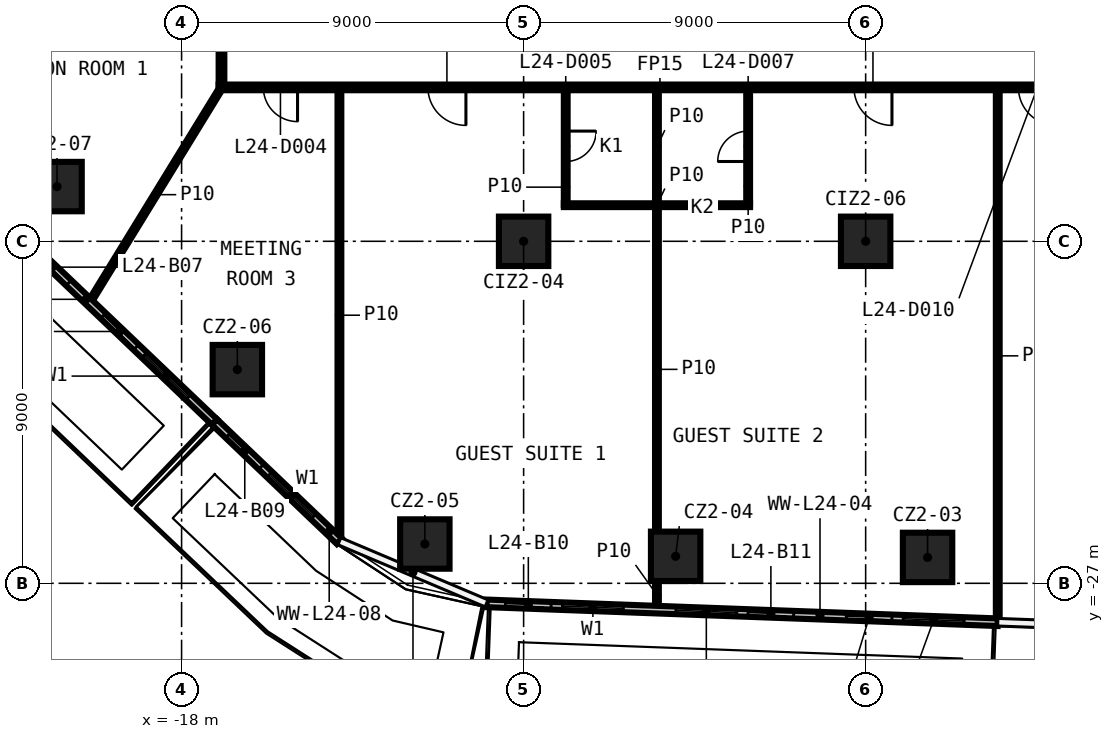
"""IFC4 building model, lengths in metres.
Left out: names, types, materials, properties, quantities, classifications, styles, units other than length and angle.
Written with IfcOpenShell. Run it as: python <this file> out.ifc"""

import sys

from ifc_helpers import new_model, si_unit, direction, frame, frame_2d, origin, origin_2d, place, context, subcontext, project, spatial, rectangle, extrude, element, fill, save


model = new_model("IFC4")
c1 = context("Model", 3, precision=1e-05, world=origin(), true_north=direction((0.0, 1.0)))
c2 = subcontext(c1, "Body", "Model", "MODEL_VIEW")
j1 = project(units=[si_unit("LENGTHUNIT", "METRE"), si_unit("PLANEANGLEUNIT", "RADIAN")], contexts=[c1])
p1 = place(None, origin())
s1 = spatial("IfcSite", under=j1, at=p1, CompositionType="ELEMENT")
p2 = place(p1, origin())
s2 = spatial("IfcBuilding", under=s1, at=p2, CompositionType="ELEMENT")
p3 = place(p2, frame((0.0, 0.0, 113.7)))
s3 = spatial("IfcBuildingStorey", under=s2, at=p3, CompositionType="ELEMENT", Elevation=113.7)
for number, where, z_axis, x_axis in (
    (1, (1.629, -26.319, 0.0), (0.0, 0.0, 1.0), (1.0, 0.0, 0.0)),
    (2, (-5.0, -26.29, 0.0), (0.0, 0.0, 1.0), (1.0, 0.0, 0.0)),
    (3, (-11.599, -25.966, 0.0), (0.0, 0.0, 1.0), (1.0, 0.0, 0.0)),
    (4, (-16.533, -21.377, 0.0), (0.0, 0.0, 1.0), (1.0, 0.0, 0.0)),
    (5, (-21.277, -16.56, 0.0), (0.0, 0.0, 1.0), (1.0, 0.0, 0.0)),
    (6, (-9.0, -18.0, 0.0), (0.0, 0.0, 1.0), (1.0, 0.0, 0.0)),
    (7, (0.0, -18.0, 0.0), (0.0, 0.0, 1.0), (1.0, 0.0, 0.0)),
):
    element("IfcColumn", number, at=place(p3, frame(where, z_axis=z_axis, x_axis=x_axis)), inside=s3, PredefinedType="COLUMN", context=c2, shape_type="SweptSolid", body=[
        extrude(rectangle(XDim=1.3, YDim=1.3, at=origin_2d()), origin(), (0.0, 0.0, 1.0), 3.3),
    ])
p4 = place(p3, frame((-7.942, -17.05, 0.0), z_axis=(0.0, 0.0, 1.0), x_axis=(1.0, 0.0, 0.0)))
e8 = element("IfcWall", 8, at=p4, inside=s3, PredefinedType="PARTITIONING", context=c2, shape_type="SweptSolid", body=[
    extrude(rectangle(XDim=4.9, YDim=0.1, at=frame_2d((2.45, 0.0))), origin(), (0.0, 0.0, 1.0), 3.3),
])
p5 = place(p3, frame((17.025, -13.95, 0.0), z_axis=(0.0, 0.0, 1.0), x_axis=(-1.0, 0.0, 0.0)))
e9 = element("IfcWall", 9, at=p5, inside=s3, PredefinedType="PARTITIONING", context=c2, shape_type="SweptSolid", body=[
    extrude(rectangle(XDim=34.05, YDim=0.15, at=frame_2d((17.025, 0.0))), origin(), (0.0, 0.0, 1.0), 3.3),
])
p6 = place(p5, frame((31.974, 0.0, 0.0)))
e10 = element("IfcOpeningElement", 10, at=p6, cuts=e9, PredefinedType="OPENING", context=c2, shape_type="SweptSolid", body=[
    extrude(rectangle(XDim=0.9, YDim=2.1, at=frame_2d((0.45, 1.05))), frame((0.0, 0.085, 0.0), z_axis=(0.0, -1.0, 0.0), x_axis=(1.0, 0.0, 0.0)), (0.0, 0.0, 1.0), 0.17),
])
p7 = place(p5, frame((27.543, 0.0, 0.0)))
e11 = element("IfcOpeningElement", 11, at=p7, cuts=e9, PredefinedType="OPENING", context=c2, shape_type="SweptSolid", body=[
    extrude(rectangle(XDim=1.0, YDim=2.1, at=frame_2d((0.5, 1.05))), frame((0.0, 0.085, 0.0), z_axis=(0.0, -1.0, 0.0), x_axis=(1.0, 0.0, 0.0)), (0.0, 0.0, 1.0), 0.17),
])
p8 = place(p5, frame((16.333, 0.0, 0.0)))
e12 = element("IfcOpeningElement", 12, at=p8, cuts=e9, PredefinedType="OPENING", context=c2, shape_type="SweptSolid", body=[
    extrude(rectangle(XDim=1.0, YDim=2.1, at=frame_2d((0.5, 1.05))), frame((0.0, 0.085, 0.0), z_axis=(0.0, -1.0, 0.0), x_axis=(1.0, 0.0, 0.0)), (0.0, 0.0, 1.0), 0.17),
])
p9 = place(p5, frame((12.006, 0.0, 0.0)))
e13 = element("IfcOpeningElement", 13, at=p9, cuts=e9, PredefinedType="OPENING", context=c2, shape_type="SweptSolid", body=[
    extrude(rectangle(XDim=1.0, YDim=2.1, at=frame_2d((0.5, 1.05))), frame((0.0, 0.085, 0.0), z_axis=(0.0, -1.0, 0.0), x_axis=(1.0, 0.0, 0.0)), (0.0, 0.0, 1.0), 0.17),
])
p10 = place(p5, frame((5.124, 0.0, 0.0)))
e14 = element("IfcOpeningElement", 14, at=p10, cuts=e9, PredefinedType="OPENING", context=c2, shape_type="SweptSolid", body=[
    extrude(rectangle(XDim=1.0, YDim=2.1, at=frame_2d((0.5, 1.05))), frame((0.0, 0.085, 0.0), z_axis=(0.0, -1.0, 0.0), x_axis=(1.0, 0.0, 0.0)), (0.0, 0.0, 1.0), 0.17),
])
p11 = place(p5, frame((3.144, 0.0, 0.0)))
e15 = element("IfcOpeningElement", 15, at=p11, cuts=e9, PredefinedType="OPENING", context=c2, shape_type="SweptSolid", body=[
    extrude(rectangle(XDim=1.0, YDim=2.1, at=frame_2d((0.5, 1.05))), frame((0.0, 0.085, 0.0), z_axis=(0.0, -1.0, 0.0), x_axis=(1.0, 0.0, 0.0)), (0.0, 0.0, 1.0), 0.17),
])
p12 = place(p3, frame((-20.415, -19.596, 0.0), z_axis=(0.0, 0.0, 1.0), x_axis=(0.5230874117, 0.85227903865, 0.0)))
e16 = element("IfcWall", 16, at=p12, inside=s3, PredefinedType="PARTITIONING", context=c2, shape_type="SweptSolid", body=[
    extrude(rectangle(XDim=6.624, YDim=0.1, at=frame_2d((3.312, 0.0))), origin(), (0.0, 0.0, 1.0), 3.3),
])
p13 = place(p3, frame((3.476, -28.004, 0.0), z_axis=(0.0, 0.0, 1.0), x_axis=(0.0, 1.0, 0.0)))
e17 = element("IfcWall", 17, at=p13, inside=s3, PredefinedType="PARTITIONING", context=c2, shape_type="SweptSolid", body=[
    extrude(rectangle(XDim=13.979, YDim=0.1, at=frame_2d((6.99, 0.0))), origin(), (0.0, 0.0, 1.0), 3.3),
])
p14 = place(p3, frame((-3.092, -17.0, 0.0), z_axis=(0.0, 0.0, 1.0), x_axis=(0.0, 1.0, 0.0)))
e18 = element("IfcWall", 18, at=p14, inside=s3, PredefinedType="PARTITIONING", context=c2, shape_type="SweptSolid", body=[
    extrude(rectangle(XDim=2.975, YDim=0.1, at=frame_2d((1.488, 0.0))), origin(), (0.0, 0.0, 1.0), 3.3),
])
p15 = place(p14, frame((1.1, 0.0, 0.0)))
e19 = element("IfcOpeningElement", 19, at=p15, cuts=e18, PredefinedType="OPENING", context=c2, shape_type="SweptSolid", body=[
    extrude(rectangle(XDim=0.8, YDim=2.1, at=frame_2d((0.4, 1.05))), frame((0.0, 0.06, 0.0), z_axis=(0.0, -1.0, 0.0), x_axis=(1.0, 0.0, 0.0)), (0.0, 0.0, 1.0), 0.12),
])
p16 = place(p3, frame((-5.492, -27.673, 0.0), z_axis=(0.0, 0.0, 1.0), x_axis=(0.0, 1.0, 0.0)))
e20 = element("IfcWall", 20, at=p16, inside=s3, PredefinedType="PARTITIONING", context=c2, shape_type="SweptSolid", body=[
    extrude(rectangle(XDim=0.733, YDim=0.1, at=frame_2d((0.367, 0.0))), origin(), (0.0, 0.0, 1.0), 3.3),
])
p17 = place(p3, frame((-5.492, -25.64, 0.0), z_axis=(0.0, 0.0, 1.0), x_axis=(0.0, 1.0, 0.0)))
e21 = element("IfcWall", 21, at=p17, inside=s3, PredefinedType="PARTITIONING", context=c2, shape_type="SweptSolid", body=[
    extrude(rectangle(XDim=8.54, YDim=0.1, at=frame_2d((4.27, 0.0))), origin(), (0.0, 0.0, 1.0), 3.3),
])
p18 = place(p3, frame((-5.492, -17.0, 0.0), z_axis=(0.0, 0.0, 1.0), x_axis=(0.0, 1.0, 0.0)))
e22 = element("IfcWall", 22, at=p18, inside=s3, PredefinedType="PARTITIONING", context=c2, shape_type="SweptSolid", body=[
    extrude(rectangle(XDim=2.975, YDim=0.1, at=frame_2d((1.488, 0.0))), origin(), (0.0, 0.0, 1.0), 3.3),
])
p19 = place(p3, frame((-7.892, -14.025, 0.0), z_axis=(0.0, 0.0, 1.0), x_axis=(0.0, -1.0, 0.0)))
e23 = element("IfcWall", 23, at=p19, inside=s3, PredefinedType="PARTITIONING", context=c2, shape_type="SweptSolid", body=[
    extrude(rectangle(XDim=3.025, YDim=0.1, at=frame_2d((1.513, 0.0))), origin(), (0.0, 0.0, 1.0), 3.3),
])
p20 = place(p19, frame((1.075, 0.0, 0.0)))
e24 = element("IfcOpeningElement", 24, at=p20, cuts=e23, PredefinedType="OPENING", context=c2, shape_type="SweptSolid", body=[
    extrude(rectangle(XDim=0.8, YDim=2.1, at=frame_2d((0.4, 1.05))), frame((0.0, 0.06, 0.0), z_axis=(0.0, -1.0, 0.0), x_axis=(1.0, 0.0, 0.0)), (0.0, 0.0, 1.0), 0.12),
])
p21 = place(p3, frame((-13.847, -25.865, 0.0), z_axis=(0.0, 0.0, 1.0), x_axis=(0.0, 1.0, 0.0)))
e25 = element("IfcWall", 25, at=p21, inside=s3, PredefinedType="PARTITIONING", context=c2, shape_type="SweptSolid", body=[
    extrude(rectangle(XDim=11.84, YDim=0.1, at=frame_2d((5.92, 0.0))), origin(), (0.0, 0.0, 1.0), 3.3),
])
p22 = place(p3, frame((-16.95, -13.875, 0.0), z_axis=(0.0, 0.0, 1.0), x_axis=(0.0, 1.0, 0.0)))
e26 = element("IfcWall", 26, at=p22, inside=s3, PredefinedType="PARTITIONING", context=c2, shape_type="SweptSolid", body=[
    extrude(rectangle(XDim=27.75, YDim=0.15, at=frame_2d((13.875, 0.0))), origin(), (0.0, 0.0, 1.0), 3.3),
])
p23 = place(p22, frame((11.06, 0.0, 0.0)))
e27 = element("IfcOpeningElement", 27, at=p23, cuts=e26, PredefinedType="OPENING", context=c2, shape_type="SweptSolid", body=[
    extrude(rectangle(XDim=0.9, YDim=2.1, at=frame_2d((0.45, 1.05))), frame((0.0, 0.085, 0.0), z_axis=(0.0, -1.0, 0.0), x_axis=(1.0, 0.0, 0.0)), (0.0, 0.0, 1.0), 0.17),
])
p24 = place(p22, frame((8.387, 0.0, 0.0)))
e28 = element("IfcOpeningElement", 28, at=p24, cuts=e26, PredefinedType="OPENING", context=c2, shape_type="SweptSolid", body=[
    extrude(rectangle(XDim=0.9, YDim=2.1, at=frame_2d((0.45, 1.05))), frame((0.0, 0.085, 0.0), z_axis=(0.0, -1.0, 0.0), x_axis=(1.0, 0.0, 0.0)), (0.0, 0.0, 1.0), 0.17),
])
p25 = place(p22, frame((1.666, 0.0, 0.0)))
e29 = element("IfcOpeningElement", 29, at=p25, cuts=e26, PredefinedType="OPENING", context=c2, shape_type="SweptSolid", body=[
    extrude(rectangle(XDim=0.9, YDim=2.1, at=frame_2d((0.45, 1.05))), frame((0.0, 0.085, 0.0), z_axis=(0.0, -1.0, 0.0), x_axis=(1.0, 0.0, 0.0)), (0.0, 0.0, 1.0), 0.17),
])
p26 = place(p22, frame((25.152, 0.0, 0.0)))
e30 = element("IfcOpeningElement", 30, at=p26, cuts=e26, PredefinedType="OPENING", context=c2, shape_type="SweptSolid", body=[
    extrude(rectangle(XDim=0.9, YDim=2.1, at=frame_2d((0.45, 1.05))), frame((0.0, 0.085, 0.0), z_axis=(0.0, -1.0, 0.0), x_axis=(1.0, 0.0, 0.0)), (0.0, 0.0, 1.0), 0.17),
])
p27 = place(p22, frame((18.782, 0.0, 0.0)))
e31 = element("IfcOpeningElement", 31, at=p27, cuts=e26, PredefinedType="OPENING", context=c2, shape_type="SweptSolid", body=[
    extrude(rectangle(XDim=1.0, YDim=2.1, at=frame_2d((0.5, 1.05))), frame((0.0, 0.085, 0.0), z_axis=(0.0, -1.0, 0.0), x_axis=(1.0, 0.0, 0.0)), (0.0, 0.0, 1.0), 0.17),
])
p28 = place(p22, frame((17.26, 0.0, 0.0)))
e32 = element("IfcOpeningElement", 32, at=p28, cuts=e26, PredefinedType="OPENING", context=c2, shape_type="SweptSolid", body=[
    extrude(rectangle(XDim=1.0, YDim=2.1, at=frame_2d((0.5, 1.05))), frame((0.0, 0.085, 0.0), z_axis=(0.0, -1.0, 0.0), x_axis=(1.0, 0.0, 0.0)), (0.0, 0.0, 1.0), 0.17),
])
p29 = place(p3, frame((-23.718, -16.471, 0.0), z_axis=(0.0, 0.0, 1.0), x_axis=(0.723342757747, -0.690489141706, 0.0)))
e33 = element("IfcWall", 33, at=p29, inside=s3, PredefinedType="SOLIDWALL", context=c2, shape_type="SweptSolid", body=[
    extrude(rectangle(XDim=9.103, YDim=0.2, at=frame_2d((4.552, 0.0))), origin(), (0.0, 0.0, 1.0), 3.3),
])
p30 = place(p29, frame((0.5, 0.0, 0.6)))
e34 = element("IfcOpeningElement", 34, at=p30, cuts=e33, PredefinedType="OPENING", context=c2, shape_type="SweptSolid", body=[
    extrude(rectangle(XDim=1.6, YDim=2.4, at=frame_2d((0.8, 1.2))), frame((0.0, 0.11, 0.0), z_axis=(0.0, -1.0, 0.0), x_axis=(1.0, 0.0, 0.0)), (0.0, 0.0, 1.0), 0.22),
])
p31 = place(p29, frame((2.6, 0.0, 0.0)))
e35 = element("IfcOpeningElement", 35, at=p31, cuts=e33, PredefinedType="OPENING", context=c2, shape_type="SweptSolid", body=[
    extrude(rectangle(XDim=1.2, YDim=2.4, at=frame_2d((0.6, 1.2))), frame((0.0, 0.11, 0.0), z_axis=(0.0, -1.0, 0.0), x_axis=(1.0, 0.0, 0.0)), (0.0, 0.0, 1.0), 0.22),
])
p32 = place(p29, frame((6.552, 0.0, 0.6)))
e36 = element("IfcOpeningElement", 36, at=p32, cuts=e33, PredefinedType="OPENING", context=c2, shape_type="SweptSolid", body=[
    extrude(rectangle(XDim=1.6, YDim=2.4, at=frame_2d((0.8, 1.2))), frame((0.0, 0.11, 0.0), z_axis=(0.0, -1.0, 0.0), x_axis=(1.0, 0.0, 0.0)), (0.0, 0.0, 1.0), 0.22),
])
p33 = place(p29, frame((5.052, 0.0, 0.0)))
e37 = element("IfcOpeningElement", 37, at=p33, cuts=e33, PredefinedType="OPENING", context=c2, shape_type="SweptSolid", body=[
    extrude(rectangle(XDim=1.2, YDim=2.4, at=frame_2d((0.6, 1.2))), frame((0.0, 0.11, 0.0), z_axis=(0.0, -1.0, 0.0), x_axis=(1.0, 0.0, 0.0)), (0.0, 0.0, 1.0), 0.22),
])
p34 = place(p3, frame((-17.133, -22.756, 0.0), z_axis=(0.0, 0.0, 1.0), x_axis=(0.723361644964, -0.69046935529, 0.0)))
e38 = element("IfcWall", 38, at=p34, inside=s3, PredefinedType="SOLIDWALL", context=c2, shape_type="SweptSolid", body=[
    extrude(rectangle(XDim=4.542, YDim=0.2, at=frame_2d((2.271, 0.0))), origin(), (0.0, 0.0, 1.0), 3.3),
])
p35 = place(p34, frame((2.0, 0.0, 0.6)))
e39 = element("IfcOpeningElement", 39, at=p35, cuts=e38, PredefinedType="OPENING", context=c2, shape_type="SweptSolid", body=[
    extrude(rectangle(XDim=1.6, YDim=2.4, at=frame_2d((0.8, 1.2))), frame((0.0, 0.11, 0.0), z_axis=(0.0, -1.0, 0.0), x_axis=(1.0, 0.0, 0.0)), (0.0, 0.0, 1.0), 0.22),
])
p36 = place(p34, frame((0.5, 0.0, 0.0)))
e40 = element("IfcOpeningElement", 40, at=p36, cuts=e38, PredefinedType="OPENING", context=c2, shape_type="SweptSolid", body=[
    extrude(rectangle(XDim=1.2, YDim=2.4, at=frame_2d((0.6, 1.2))), frame((0.0, 0.11, 0.0), z_axis=(0.0, -1.0, 0.0), x_axis=(1.0, 0.0, 0.0)), (0.0, 0.0, 1.0), 0.22),
])
p37 = place(p3, frame((-9.975, -27.528, 0.0), z_axis=(0.0, 0.0, 1.0), x_axis=(0.999319917794, -0.036874135924, 0.0)))
e41 = element("IfcWall", 41, at=p37, inside=s3, PredefinedType="SOLIDWALL", context=c2, shape_type="SweptSolid", body=[
    extrude(rectangle(XDim=13.46, YDim=0.2, at=frame_2d((6.73, 0.0))), origin(), (0.0, 0.0, 1.0), 3.3),
])
p38 = place(p37, frame((2.0, 0.0, 0.6)))
e42 = element("IfcOpeningElement", 42, at=p38, cuts=e41, PredefinedType="OPENING", context=c2, shape_type="SweptSolid", body=[
    extrude(rectangle(XDim=1.6, YDim=2.4, at=frame_2d((0.8, 1.2))), frame((0.0, 0.11, 0.0), z_axis=(0.0, -1.0, 0.0), x_axis=(1.0, 0.0, 0.0)), (0.0, 0.0, 1.0), 0.22),
])
p39 = place(p37, frame((0.5, 0.0, 0.0)))
e43 = element("IfcOpeningElement", 43, at=p39, cuts=e41, PredefinedType="OPENING", context=c2, shape_type="SweptSolid", body=[
    extrude(rectangle(XDim=1.2, YDim=2.4, at=frame_2d((0.6, 1.2))), frame((0.0, 0.11, 0.0), z_axis=(0.0, -1.0, 0.0), x_axis=(1.0, 0.0, 0.0)), (0.0, 0.0, 1.0), 0.22),
])
p40 = place(p37, frame((4.987, 0.0, 0.6)))
e44 = element("IfcOpeningElement", 44, at=p40, cuts=e41, PredefinedType="OPENING", context=c2, shape_type="SweptSolid", body=[
    extrude(rectangle(XDim=1.6, YDim=2.4, at=frame_2d((0.8, 1.2))), frame((0.0, 0.11, 0.0), z_axis=(0.0, -1.0, 0.0), x_axis=(1.0, 0.0, 0.0)), (0.0, 0.0, 1.0), 0.22),
])
p41 = place(p37, frame((6.887, 0.0, 0.0)))
e45 = element("IfcOpeningElement", 45, at=p41, cuts=e41, PredefinedType="OPENING", context=c2, shape_type="SweptSolid", body=[
    extrude(rectangle(XDim=1.2, YDim=2.4, at=frame_2d((0.6, 1.2))), frame((0.0, 0.11, 0.0), z_axis=(0.0, -1.0, 0.0), x_axis=(1.0, 0.0, 0.0)), (0.0, 0.0, 1.0), 0.22),
])
p42 = place(p37, frame((10.974, 0.0, 0.6)))
e46 = element("IfcOpeningElement", 46, at=p42, cuts=e41, PredefinedType="OPENING", context=c2, shape_type="SweptSolid", body=[
    extrude(rectangle(XDim=1.6, YDim=2.4, at=frame_2d((0.8, 1.2))), frame((0.0, 0.11, 0.0), z_axis=(0.0, -1.0, 0.0), x_axis=(1.0, 0.0, 0.0)), (0.0, 0.0, 1.0), 0.22),
])
p43 = place(p37, frame((9.474, 0.0, 0.0)))
e47 = element("IfcOpeningElement", 47, at=p43, cuts=e41, PredefinedType="OPENING", context=c2, shape_type="SweptSolid", body=[
    extrude(rectangle(XDim=1.2, YDim=2.4, at=frame_2d((0.6, 1.2))), frame((0.0, 0.11, 0.0), z_axis=(0.0, -1.0, 0.0), x_axis=(1.0, 0.0, 0.0)), (0.0, 0.0, 1.0), 0.22),
])
p44 = place(p6, origin())
e48 = element("IfcDoor", 48, at=p44, inside=s3, OperationType="SINGLE_SWING_RIGHT", PredefinedType="DOOR", context=c2, shape_type="SweptSolid", body=[
    extrude(rectangle(XDim=0.9, YDim=2.1, at=frame_2d((0.45, 1.05))), frame((0.0, 0.025, 0.0), z_axis=(0.0, -1.0, 0.0), x_axis=(1.0, 0.0, 0.0)), (0.0, 0.0, 1.0), 0.05),
])
fill(e10, e48)
p45 = place(p20, origin())
e49 = element("IfcDoor", 49, at=p45, inside=s3, OperationType="SINGLE_SWING_RIGHT", PredefinedType="DOOR", context=c2, shape_type="SweptSolid", body=[
    extrude(rectangle(XDim=0.8, YDim=2.1, at=frame_2d((0.4, 1.05))), frame((0.0, 0.025, 0.0), z_axis=(0.0, -1.0, 0.0), x_axis=(1.0, 0.0, 0.0)), (0.0, 0.0, 1.0), 0.05),
])
fill(e24, e49)
p46 = place(p7, origin())
e50 = element("IfcDoor", 50, at=p46, inside=s3, OperationType="SINGLE_SWING_LEFT", PredefinedType="DOOR", context=c2, shape_type="SweptSolid", body=[
    extrude(rectangle(XDim=1.0, YDim=2.1, at=frame_2d((0.5, 1.05))), frame((0.0, 0.025, 0.0), z_axis=(0.0, -1.0, 0.0), x_axis=(1.0, 0.0, 0.0)), (0.0, 0.0, 1.0), 0.05),
])
fill(e11, e50)
p47 = place(p15, origin())
e51 = element("IfcDoor", 51, at=p47, inside=s3, OperationType="SINGLE_SWING_LEFT", PredefinedType="DOOR", context=c2, shape_type="SweptSolid", body=[
    extrude(rectangle(XDim=0.8, YDim=2.1, at=frame_2d((0.4, 1.05))), frame((0.0, 0.025, 0.0), z_axis=(0.0, -1.0, 0.0), x_axis=(1.0, 0.0, 0.0)), (0.0, 0.0, 1.0), 0.05),
])
fill(e19, e51)
p48 = place(p8, origin())
e52 = element("IfcDoor", 52, at=p48, inside=s3, OperationType="SINGLE_SWING_RIGHT", PredefinedType="DOOR", context=c2, shape_type="SweptSolid", body=[
    extrude(rectangle(XDim=1.0, YDim=2.1, at=frame_2d((0.5, 1.05))), frame((0.0, 0.025, 0.0), z_axis=(0.0, -1.0, 0.0), x_axis=(1.0, 0.0, 0.0)), (0.0, 0.0, 1.0), 0.05),
])
fill(e12, e52)
p49 = place(p9, origin())
e53 = element("IfcDoor", 53, at=p49, inside=s3, OperationType="SINGLE_SWING_LEFT", PredefinedType="DOOR", context=c2, shape_type="SweptSolid", body=[
    extrude(rectangle(XDim=1.0, YDim=2.1, at=frame_2d((0.5, 1.05))), frame((0.0, 0.025, 0.0), z_axis=(0.0, -1.0, 0.0), x_axis=(1.0, 0.0, 0.0)), (0.0, 0.0, 1.0), 0.05),
])
fill(e13, e53)
p50 = place(p31, origin())
e54 = element("IfcDoor", 54, at=p50, inside=s3, OperationType="SLIDING_TO_LEFT", PredefinedType="DOOR", context=c2, shape_type="SweptSolid", body=[
    extrude(rectangle(XDim=1.2, YDim=2.4, at=frame_2d((0.6, 1.2))), frame((0.0, 0.025, 0.0), z_axis=(0.0, -1.0, 0.0), x_axis=(1.0, 0.0, 0.0)), (0.0, 0.0, 1.0), 0.05),
])
fill(e35, e54)
p51 = place(p32, origin())
e55 = element("IfcWindow", 55, at=p51, inside=s3, PartitioningType="SINGLE_PANEL", PredefinedType="WINDOW", context=c2, shape_type="SweptSolid", body=[
    extrude(rectangle(XDim=1.6, YDim=2.4, at=frame_2d((0.8, 1.2))), frame((0.0, 0.03, 0.0), z_axis=(0.0, -1.0, 0.0), x_axis=(1.0, 0.0, 0.0)), (0.0, 0.0, 1.0), 0.06),
])
fill(e36, e55)
p52 = place(p33, origin())
e56 = element("IfcDoor", 56, at=p52, inside=s3, OperationType="SLIDING_TO_LEFT", PredefinedType="DOOR", context=c2, shape_type="SweptSolid", body=[
    extrude(rectangle(XDim=1.2, YDim=2.4, at=frame_2d((0.6, 1.2))), frame((0.0, 0.025, 0.0), z_axis=(0.0, -1.0, 0.0), x_axis=(1.0, 0.0, 0.0)), (0.0, 0.0, 1.0), 0.05),
])
fill(e37, e56)
p53 = place(p35, origin())
e57 = element("IfcWindow", 57, at=p53, inside=s3, PartitioningType="SINGLE_PANEL", PredefinedType="WINDOW", context=c2, shape_type="SweptSolid", body=[
    extrude(rectangle(XDim=1.6, YDim=2.4, at=frame_2d((0.8, 1.2))), frame((0.0, 0.03, 0.0), z_axis=(0.0, -1.0, 0.0), x_axis=(1.0, 0.0, 0.0)), (0.0, 0.0, 1.0), 0.06),
])
fill(e39, e57)
p54 = place(p36, origin())
e58 = element("IfcDoor", 58, at=p54, inside=s3, OperationType="SLIDING_TO_LEFT", PredefinedType="DOOR", context=c2, shape_type="SweptSolid", body=[
    extrude(rectangle(XDim=1.2, YDim=2.4, at=frame_2d((0.6, 1.2))), frame((0.0, 0.025, 0.0), z_axis=(0.0, -1.0, 0.0), x_axis=(1.0, 0.0, 0.0)), (0.0, 0.0, 1.0), 0.05),
])
fill(e40, e58)
p55 = place(p38, origin())
e59 = element("IfcWindow", 59, at=p55, inside=s3, PartitioningType="SINGLE_PANEL", PredefinedType="WINDOW", context=c2, shape_type="SweptSolid", body=[
    extrude(rectangle(XDim=1.6, YDim=2.4, at=frame_2d((0.8, 1.2))), frame((0.0, 0.03, 0.0), z_axis=(0.0, -1.0, 0.0), x_axis=(1.0, 0.0, 0.0)), (0.0, 0.0, 1.0), 0.06),
])
fill(e42, e59)
p56 = place(p39, origin())
e60 = element("IfcDoor", 60, at=p56, inside=s3, OperationType="SLIDING_TO_LEFT", PredefinedType="DOOR", context=c2, shape_type="SweptSolid", body=[
    extrude(rectangle(XDim=1.2, YDim=2.4, at=frame_2d((0.6, 1.2))), frame((0.0, 0.025, 0.0), z_axis=(0.0, -1.0, 0.0), x_axis=(1.0, 0.0, 0.0)), (0.0, 0.0, 1.0), 0.05),
])
fill(e43, e60)
p57 = place(p40, origin())
e61 = element("IfcWindow", 61, at=p57, inside=s3, PartitioningType="SINGLE_PANEL", PredefinedType="WINDOW", context=c2, shape_type="SweptSolid", body=[
    extrude(rectangle(XDim=1.6, YDim=2.4, at=frame_2d((0.8, 1.2))), frame((0.0, 0.03, 0.0), z_axis=(0.0, -1.0, 0.0), x_axis=(1.0, 0.0, 0.0)), (0.0, 0.0, 1.0), 0.06),
])
fill(e44, e61)
p58 = place(p41, origin())
e62 = element("IfcDoor", 62, at=p58, inside=s3, OperationType="SLIDING_TO_LEFT", PredefinedType="DOOR", context=c2, shape_type="SweptSolid", body=[
    extrude(rectangle(XDim=1.2, YDim=2.4, at=frame_2d((0.6, 1.2))), frame((0.0, 0.025, 0.0), z_axis=(0.0, -1.0, 0.0), x_axis=(1.0, 0.0, 0.0)), (0.0, 0.0, 1.0), 0.05),
])
fill(e45, e62)
p59 = place(p42, origin())
e63 = element("IfcWindow", 63, at=p59, inside=s3, PartitioningType="SINGLE_PANEL", PredefinedType="WINDOW", context=c2, shape_type="SweptSolid", body=[
    extrude(rectangle(XDim=1.6, YDim=2.4, at=frame_2d((0.8, 1.2))), frame((0.0, 0.03, 0.0), z_axis=(0.0, -1.0, 0.0), x_axis=(1.0, 0.0, 0.0)), (0.0, 0.0, 1.0), 0.06),
])
fill(e46, e63)
p60 = place(p43, origin())
e64 = element("IfcDoor", 64, at=p60, inside=s3, OperationType="SLIDING_TO_LEFT", PredefinedType="DOOR", context=c2, shape_type="SweptSolid", body=[
    extrude(rectangle(XDim=1.2, YDim=2.4, at=frame_2d((0.6, 1.2))), frame((0.0, 0.025, 0.0), z_axis=(0.0, -1.0, 0.0), x_axis=(1.0, 0.0, 0.0)), (0.0, 0.0, 1.0), 0.05),
])
fill(e47, e64)
save(model, sys.argv[1])
